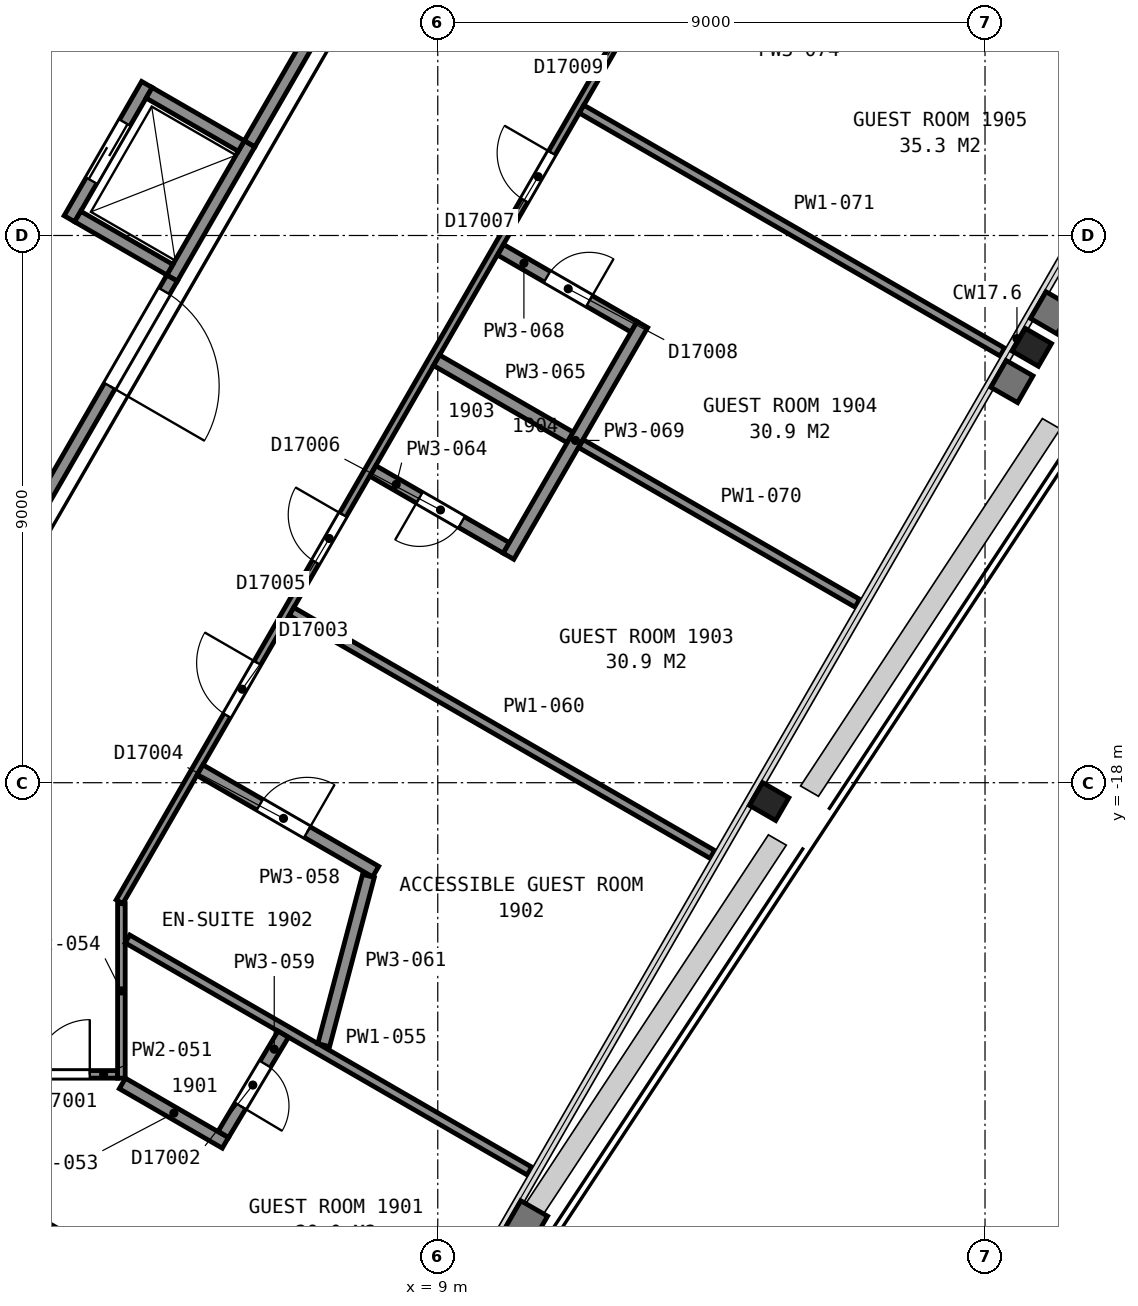
"""IFC4 building model, lengths in metres.
Left out: names, types, materials, properties, quantities, classifications, styles, units other than length and angle.
Written with IfcOpenShell. Run it as: python <this file> out.ifc"""

import sys

from ifc_helpers import new_model, si_unit, direction, frame, frame_2d, origin, origin_2d, place, context, subcontext, project, spatial, rectangle, i_section, extrude, element, fill, save


model = new_model("IFC4")
c1 = context("Model", 3, precision=1e-05, world=origin(), true_north=direction((0.0, 1.0)))
c2 = subcontext(c1, "Body", "Model", "MODEL_VIEW")
j1 = project(units=[si_unit("LENGTHUNIT", "METRE"), si_unit("PLANEANGLEUNIT", "RADIAN")], contexts=[c1])
p1 = place(None, origin())
s1 = spatial("IfcSite", under=j1, at=p1, CompositionType="ELEMENT")
p2 = place(p1, origin())
s2 = spatial("IfcBuilding", under=s1, at=p2, CompositionType="ELEMENT")
p3 = place(p2, frame((0.0, 0.0, 83.6)))
s3 = spatial("IfcBuildingStorey", under=s2, at=p3, CompositionType="ELEMENT", Elevation=83.6)
for number, where, z_axis, x_axis in (
    (1, (14.45, -18.31, 0.0), (0.0, 0.0, 1.0), (-0.5, -0.866, 0.0)),
    (2, (18.77, -10.84, 0.0), (0.0, 0.0, 1.0), (-0.5, -0.866, 0.0)),
):
    element("IfcColumn", number, at=place(p3, frame(where, z_axis=z_axis, x_axis=x_axis)), inside=s3, PredefinedType="COLUMN", context=c2, shape_type="SweptSolid", body=[
        extrude(i_section(OverallWidth=0.432, OverallDepth=0.498, WebThickness=0.056, FlangeThickness=0.089, FilletRadius=0.015, at=origin_2d()), origin(), (0.0, 0.0, 1.0), 2.87),
    ])
p4 = place(p3, frame((4.63, -9.7, 0.0), z_axis=(0.0, 0.0, 1.0), x_axis=(0.500062241894, 0.865989465428, 0.0)))
e3 = element("IfcWall", 3, at=p4, inside=s3, PredefinedType="PARTITIONING", context=c2, shape_type="SweptSolid", body=[
    extrude(rectangle(XDim=2.55, YDim=0.2, at=frame_2d((1.275, 0.0))), origin(), (0.0, 0.0, 1.0), 3.6),
])
p5 = place(p3, frame((2.942, -8.725, 0.0), z_axis=(0.0, 0.0, 1.0), x_axis=(0.500020783669, 0.866013403995, 0.0)))
e4 = element("IfcWall", 4, at=p5, inside=s3, PredefinedType="PARTITIONING", context=c2, shape_type="SweptSolid", body=[
    extrude(rectangle(XDim=2.55, YDim=0.2, at=frame_2d((1.275, 0.0))), origin(), (0.0, 0.0, 1.0), 3.6),
])
p6 = place(p5, frame((0.725, 0.0, 0.0)))
e5 = element("IfcOpeningElement", 5, at=p6, cuts=e4, PredefinedType="OPENING", context=c2, shape_type="SweptSolid", body=[
    extrude(rectangle(XDim=1.1, YDim=2.1, at=frame_2d((0.55, 1.05))), frame((0.0, 0.11, 0.0), z_axis=(0.0, -1.0, 0.0), x_axis=(1.0, 0.0, 0.0)), (0.0, 0.0, 1.0), 0.22),
])
p7 = place(p3, frame((5.769, -7.528, 0.0), z_axis=(0.0, 0.0, 1.0), x_axis=(-0.866002029911, 0.500040482552, 0.0)))
e6 = element("IfcWall", 6, at=p7, inside=s3, PredefinedType="PARTITIONING", context=c2, shape_type="SweptSolid", body=[
    extrude(rectangle(XDim=1.75, YDim=0.2, at=frame_2d((0.875, 0.0))), origin(), (0.0, 0.0, 1.0), 3.6),
])
p8 = place(p3, frame((4.594, -9.563, 0.0), z_axis=(0.0, 0.0, 1.0), x_axis=(-0.866036909293, 0.499980071345, 0.0)))
e7 = element("IfcWall", 7, at=p8, inside=s3, PredefinedType="PARTITIONING", context=c2, shape_type="SweptSolid", body=[
    extrude(rectangle(XDim=1.75, YDim=0.2, at=frame_2d((0.875, 0.0))), origin(), (0.0, 0.0, 1.0), 3.6),
])
p9 = place(p3, frame((1.677, -14.815, 0.0), z_axis=(0.0, 0.0, 1.0), x_axis=(0.49999445743, 0.866028603765, 0.0)))
e8 = element("IfcWall", 8, at=p9, inside=s3, PredefinedType="PARTITIONING", context=c2, shape_type="SweptSolid", body=[
    extrude(rectangle(XDim=5.905, YDim=0.2, at=frame_2d((2.952, 0.0))), origin(), (0.0, 0.0, 1.0), 3.35),
])
p10 = place(p9, frame((3.855, 0.0, 0.0)))
e9 = element("IfcOpeningElement", 9, at=p10, cuts=e8, PredefinedType="OPENING", context=c2, shape_type="SweptSolid", body=[
    extrude(rectangle(XDim=1.8, YDim=2.1, at=frame_2d((0.9, 1.05))), frame((0.0, 0.11, 0.0), z_axis=(0.0, -1.0, 0.0), x_axis=(1.0, 0.0, 0.0)), (0.0, 0.0, 1.0), 0.22),
])
p11 = place(p3, frame((5.906, -7.49, 0.0), z_axis=(0.0, 0.0, 1.0), x_axis=(0.500252727967, 0.865879442048, 0.0)))
e10 = element("IfcWall", 10, at=p11, inside=s3, PredefinedType="PARTITIONING", context=c2, shape_type="SweptSolid", body=[
    extrude(rectangle(XDim=2.617, YDim=0.2, at=frame_2d((1.309, 0.0))), origin(), (0.0, 0.0, 1.0), 3.35),
])
p12 = place(p3, frame((1.203, -24.522, 0.0), z_axis=(0.0, 0.0, 1.0), x_axis=(0.866021771655, -0.500006290979, 0.0)))
e11 = element("IfcWall", 11, at=p12, inside=s3, PredefinedType="PARTITIONING", context=c2, shape_type="SweptSolid", body=[
    extrude(rectangle(XDim=7.992, YDim=0.15, at=frame_2d((3.996, 0.0))), origin(), (0.0, 0.0, 1.0), 2.262),
])
p13 = place(p3, frame((3.732, -22.797, 0.0), z_axis=(0.0, 0.0, 1.0), x_axis=(-1.0, 0.0, 0.0)))
e12 = element("IfcWall", 12, at=p13, inside=s3, PredefinedType="PARTITIONING", context=c2, shape_type="SweptSolid", body=[
    extrude(rectangle(XDim=1.52, YDim=0.125, at=frame_2d((0.76, 0.0))), origin(), (0.0, 0.0, 1.0), 2.262),
])
p14 = place(p13, frame((0.455, 0.0, 0.0)))
e13 = element("IfcOpeningElement", 13, at=p14, cuts=e12, PredefinedType="OPENING", context=c2, shape_type="SweptSolid", body=[
    extrude(rectangle(XDim=0.9, YDim=2.1, at=frame_2d((0.45, 1.05))), frame((0.0, 0.073, 0.0), z_axis=(0.0, -1.0, 0.0), x_axis=(1.0, 0.0, 0.0)), (0.0, 0.0, 1.0), 0.145),
])
p15 = place(p3, frame((3.813, -22.946, 0.0), z_axis=(0.0, 0.0, 1.0), x_axis=(0.865944380701, -0.500140309845, 0.0)))
e14 = element("IfcWall", 14, at=p15, inside=s3, PredefinedType="PARTITIONING", context=c2, shape_type="SweptSolid", body=[
    extrude(rectangle(XDim=1.956, YDim=0.2, at=frame_2d((0.978, 0.0))), origin(), (0.0, 0.0, 1.0), 2.262),
])
p16 = place(p3, frame((3.797, -22.86, 0.0), z_axis=(0.0, 0.0, 1.0), x_axis=(0.0, 1.0, 0.0)))
e15 = element("IfcWall", 15, at=p16, inside=s3, PredefinedType="PARTITIONING", context=c2, shape_type="SweptSolid", body=[
    extrude(rectangle(XDim=2.871, YDim=0.125, at=frame_2d((1.435, 0.0))), origin(), (0.0, 0.0, 1.0), 2.262),
])
p17 = place(p3, frame((3.897, -20.57, 0.0), z_axis=(0.0, 0.0, 1.0), x_axis=(0.866030628547, -0.499990950336, 0.0)))
e16 = element("IfcWall", 16, at=p17, inside=s3, PredefinedType="PARTITIONING", context=c2, shape_type="SweptSolid", body=[
    extrude(rectangle(XDim=7.635, YDim=0.15, at=frame_2d((3.817, 0.0))), origin(), (0.0, 0.0, 1.0), 2.262),
])
p18 = place(p3, frame((19.456, 7.217, 0.0), z_axis=(0.0, 0.0, 1.0), x_axis=(-0.50002170027, -0.866012874765, 0.0)))
e17 = element("IfcWall", 17, at=p18, inside=s3, PredefinedType="PARTITIONING", context=c2, shape_type="SweptSolid", body=[
    extrude(rectangle(XDim=31.379, YDim=0.125, at=frame_2d((15.69, 0.0))), origin(), (0.0, 0.0, 1.0), 2.262),
])
p19 = place(p18, frame((26.843, 0.0, 0.0)))
e18 = element("IfcOpeningElement", 18, at=p19, cuts=e17, PredefinedType="OPENING", context=c2, shape_type="SweptSolid", body=[
    extrude(rectangle(XDim=1.0, YDim=2.1, at=frame_2d((0.5, 1.05))), frame((0.0, 0.073, 0.0), z_axis=(0.0, -1.0, 0.0), x_axis=(1.0, 0.0, 0.0)), (0.0, 0.0, 1.0), 0.145),
])
p20 = place(p18, frame((24.03, 0.0, 0.0)))
e19 = element("IfcOpeningElement", 19, at=p20, cuts=e17, PredefinedType="OPENING", context=c2, shape_type="SweptSolid", body=[
    extrude(rectangle(XDim=0.9, YDim=2.1, at=frame_2d((0.45, 1.05))), frame((0.0, 0.073, 0.0), z_axis=(0.0, -1.0, 0.0), x_axis=(1.0, 0.0, 0.0)), (0.0, 0.0, 1.0), 0.145),
])
p21 = place(p18, frame((17.159, 0.0, 0.0)))
e20 = element("IfcOpeningElement", 20, at=p21, cuts=e17, PredefinedType="OPENING", context=c2, shape_type="SweptSolid", body=[
    extrude(rectangle(XDim=0.9, YDim=2.1, at=frame_2d((0.45, 1.05))), frame((0.0, 0.073, 0.0), z_axis=(0.0, -1.0, 0.0), x_axis=(1.0, 0.0, 0.0)), (0.0, 0.0, 1.0), 0.145),
])
p22 = place(p18, frame((14.24, 0.0, 0.0)))
e21 = element("IfcOpeningElement", 21, at=p22, cuts=e17, PredefinedType="OPENING", context=c2, shape_type="SweptSolid", body=[
    extrude(rectangle(XDim=0.9, YDim=2.1, at=frame_2d((0.45, 1.05))), frame((0.0, 0.073, 0.0), z_axis=(0.0, -1.0, 0.0), x_axis=(1.0, 0.0, 0.0)), (0.0, 0.0, 1.0), 0.145),
])
p23 = place(p18, frame((6.997, 0.0, 0.0)))
e22 = element("IfcOpeningElement", 22, at=p23, cuts=e17, PredefinedType="OPENING", context=c2, shape_type="SweptSolid", body=[
    extrude(rectangle(XDim=0.9, YDim=2.1, at=frame_2d((0.45, 1.05))), frame((0.0, 0.073, 0.0), z_axis=(0.0, -1.0, 0.0), x_axis=(1.0, 0.0, 0.0)), (0.0, 0.0, 1.0), 0.145),
])
p24 = place(p18, frame((4.327, 0.0, 0.0)))
e23 = element("IfcOpeningElement", 23, at=p24, cuts=e17, PredefinedType="OPENING", context=c2, shape_type="SweptSolid", body=[
    extrude(rectangle(XDim=0.9, YDim=2.1, at=frame_2d((0.45, 1.05))), frame((0.0, 0.073, 0.0), z_axis=(0.0, -1.0, 0.0), x_axis=(1.0, 0.0, 0.0)), (0.0, 0.0, 1.0), 0.145),
])
p25 = place(p3, frame((7.979, -19.462, 0.0), z_axis=(0.0, 0.0, 1.0), x_axis=(-0.866033317326, 0.499986293093, 0.0)))
e24 = element("IfcWall", 24, at=p25, inside=s3, PredefinedType="PARTITIONING", context=c2, shape_type="SweptSolid", body=[
    extrude(rectangle(XDim=3.337, YDim=0.2, at=frame_2d((1.669, 0.0))), origin(), (0.0, 0.0, 1.0), 2.262),
])
p26 = place(p25, frame((1.3, 0.0, 0.0)))
e25 = element("IfcOpeningElement", 25, at=p26, cuts=e24, PredefinedType="OPENING", context=c2, shape_type="SweptSolid", body=[
    extrude(rectangle(XDim=0.9, YDim=2.1, at=frame_2d((0.45, 1.05))), frame((0.0, 0.11, 0.0), z_axis=(0.0, -1.0, 0.0), x_axis=(1.0, 0.0, 0.0)), (0.0, 0.0, 1.0), 0.22),
])
p27 = place(p3, frame((5.474, -23.784, 0.0), z_axis=(0.0, 0.0, 1.0), x_axis=(0.512791921509, 0.858512926656, 0.0)))
e26 = element("IfcWall", 26, at=p27, inside=s3, PredefinedType="PARTITIONING", context=c2, shape_type="SweptSolid", body=[
    extrude(rectangle(XDim=1.919, YDim=0.2, at=frame_2d((0.959, 0.0))), origin(), (0.0, 0.0, 1.0), 2.262),
])
p28 = place(p27, frame((0.545, 0.0, 0.0)))
e27 = element("IfcOpeningElement", 27, at=p28, cuts=e26, PredefinedType="OPENING", context=c2, shape_type="SweptSolid", body=[
    extrude(rectangle(XDim=0.8, YDim=2.1, at=frame_2d((0.4, 1.05))), frame((0.0, 0.11, 0.0), z_axis=(0.0, -1.0, 0.0), x_axis=(1.0, 0.0, 0.0)), (0.0, 0.0, 1.0), 0.22),
])
p29 = place(p3, frame((6.595, -15.183, 0.0), z_axis=(0.0, 0.0, 1.0), x_axis=(0.866014133745, -0.500019519773, 0.0)))
e28 = element("IfcWall", 28, at=p29, inside=s3, PredefinedType="PARTITIONING", context=c2, shape_type="SweptSolid", body=[
    extrude(rectangle(XDim=7.991, YDim=0.15, at=frame_2d((3.996, 0.0))), origin(), (0.0, 0.0, 1.0), 2.262),
])
p30 = place(p3, frame((7.124, -22.317, 0.0), z_axis=(0.0, 0.0, 1.0), x_axis=(0.255720101769, 0.966750862193, 0.0)))
e29 = element("IfcWall", 29, at=p30, inside=s3, PredefinedType="PARTITIONING", context=c2, shape_type="SweptSolid", body=[
    extrude(rectangle(XDim=2.879, YDim=0.2, at=frame_2d((1.44, 0.0))), origin(), (0.0, 0.0, 1.0), 2.262),
])
p31 = place(p3, frame((7.935, -12.873, 0.0), z_axis=(0.0, 0.0, 1.0), x_axis=(0.866015388607, -0.500017346395, 0.0)))
e30 = element("IfcWall", 30, at=p31, inside=s3, PredefinedType="PARTITIONING", context=c2, shape_type="SweptSolid", body=[
    extrude(rectangle(XDim=2.532, YDim=0.2, at=frame_2d((1.266, 0.0))), origin(), (0.0, 0.0, 1.0), 2.262),
])
p32 = place(p31, frame((0.883, 0.0, 0.0)))
e31 = element("IfcOpeningElement", 31, at=p32, cuts=e30, PredefinedType="OPENING", context=c2, shape_type="SweptSolid", body=[
    extrude(rectangle(XDim=0.8, YDim=2.1, at=frame_2d((0.4, 1.05))), frame((0.0, 0.11, 0.0), z_axis=(0.0, -1.0, 0.0), x_axis=(1.0, 0.0, 0.0)), (0.0, 0.0, 1.0), 0.22),
])
p33 = place(p3, frame((8.98, -11.052, 0.0), z_axis=(0.0, 0.0, 1.0), x_axis=(0.865990087344, -0.500061164881, 0.0)))
e32 = element("IfcWall", 32, at=p33, inside=s3, PredefinedType="PARTITIONING", context=c2, shape_type="SweptSolid", body=[
    extrude(rectangle(XDim=2.537, YDim=0.2, at=frame_2d((1.269, 0.0))), origin(), (0.0, 0.0, 1.0), 2.262),
])
p34 = place(p3, frame((12.228, -10.502, 0.0), z_axis=(0.0, 0.0, 1.0), x_axis=(-0.866111763775, 0.499850390267, 0.0)))
e33 = element("IfcWall", 33, at=p34, inside=s3, PredefinedType="PARTITIONING", context=c2, shape_type="SweptSolid", body=[
    extrude(rectangle(XDim=2.533, YDim=0.2, at=frame_2d((1.267, 0.0))), origin(), (0.0, 0.0, 1.0), 2.262),
])
p35 = place(p34, frame((0.851, 0.0, 0.0)))
e34 = element("IfcOpeningElement", 34, at=p35, cuts=e33, PredefinedType="OPENING", context=c2, shape_type="SweptSolid", body=[
    extrude(rectangle(XDim=0.8, YDim=2.1, at=frame_2d((0.4, 1.05))), frame((0.0, 0.11, 0.0), z_axis=(0.0, -1.0, 0.0), x_axis=(1.0, 0.0, 0.0)), (0.0, 0.0, 1.0), 0.22),
])
p36 = place(p3, frame((10.164, -14.276, 0.0), z_axis=(0.0, 0.0, 1.0), x_axis=(0.50017868667, 0.865922214405, 0.0)))
e35 = element("IfcWall", 35, at=p36, inside=s3, PredefinedType="PARTITIONING", context=c2, shape_type="SweptSolid", body=[
    extrude(rectangle(XDim=4.4, YDim=0.2, at=frame_2d((2.2, 0.0))), origin(), (0.0, 0.0, 1.0), 2.262),
])
p37 = place(p3, frame((11.355, -12.424, 0.0), z_axis=(0.0, 0.0, 1.0), x_axis=(0.866030680601, -0.499990860175, 0.0)))
e36 = element("IfcWall", 36, at=p37, inside=s3, PredefinedType="PARTITIONING", context=c2, shape_type="SweptSolid", body=[
    extrude(rectangle(XDim=5.249, YDim=0.15, at=frame_2d((2.625, 0.0))), origin(), (0.0, 0.0, 1.0), 2.262),
])
p38 = place(p3, frame((11.365, -6.921, 0.0), z_axis=(0.0, 0.0, 1.0), x_axis=(0.866008543052, -0.500029202507, 0.0)))
e37 = element("IfcWall", 37, at=p38, inside=s3, PredefinedType="PARTITIONING", context=c2, shape_type="SweptSolid", body=[
    extrude(rectangle(XDim=7.992, YDim=0.15, at=frame_2d((3.996, 0.0))), origin(), (0.0, 0.0, 1.0), 2.262),
])
p39 = place(p3, frame((14.065, -2.254, 0.0), z_axis=(0.0, 0.0, 1.0), x_axis=(0.866045096311, -0.499965889992, 0.0)))
e38 = element("IfcWall", 38, at=p39, inside=s3, PredefinedType="PARTITIONING", context=c2, shape_type="SweptSolid", body=[
    extrude(rectangle(XDim=7.987, YDim=0.15, at=frame_2d((3.993, 0.0))), origin(), (0.0, 0.0, 1.0), 2.262),
])
p40 = place(p6, origin())
e39 = element("IfcDoor", 39, at=p40, inside=s3, OperationType="SLIDING_TO_RIGHT", PredefinedType="DOOR", context=c2, shape_type="SweptSolid", body=[
    extrude(rectangle(XDim=1.1, YDim=2.1, at=frame_2d((0.55, 1.05))), frame((0.0, 0.025, 0.0), z_axis=(0.0, -1.0, 0.0), x_axis=(1.0, 0.0, 0.0)), (0.0, 0.0, 1.0), 0.05),
])
fill(e5, e39)
p41 = place(p10, origin())
e40 = element("IfcDoor", 40, at=p41, inside=s3, OperationType="DOUBLE_DOOR_SINGLE_SWING", PredefinedType="DOOR", context=c2, shape_type="SweptSolid", body=[
    extrude(rectangle(XDim=1.8, YDim=2.1, at=frame_2d((0.9, 1.05))), frame((0.0, 0.025, 0.0), z_axis=(0.0, -1.0, 0.0), x_axis=(1.0, 0.0, 0.0)), (0.0, 0.0, 1.0), 0.05),
])
fill(e9, e40)
p42 = place(p14, origin())
e41 = element("IfcDoor", 41, at=p42, inside=s3, OperationType="SINGLE_SWING_LEFT", PredefinedType="DOOR", context=c2, shape_type="SweptSolid", body=[
    extrude(rectangle(XDim=0.9, YDim=2.1, at=frame_2d((0.45, 1.05))), frame((0.0, 0.025, 0.0), z_axis=(0.0, -1.0, 0.0), x_axis=(1.0, 0.0, 0.0)), (0.0, 0.0, 1.0), 0.05),
])
fill(e13, e41)
p43 = place(p19, origin())
e42 = element("IfcDoor", 42, at=p43, inside=s3, OperationType="SINGLE_SWING_LEFT", PredefinedType="DOOR", context=c2, shape_type="SweptSolid", body=[
    extrude(rectangle(XDim=1.0, YDim=2.1, at=frame_2d((0.5, 1.05))), frame((0.0, 0.025, 0.0), z_axis=(0.0, -1.0, 0.0), x_axis=(1.0, 0.0, 0.0)), (0.0, 0.0, 1.0), 0.05),
])
fill(e18, e42)
p44 = place(p20, origin())
e43 = element("IfcDoor", 43, at=p44, inside=s3, OperationType="SINGLE_SWING_LEFT", PredefinedType="DOOR", context=c2, shape_type="SweptSolid", body=[
    extrude(rectangle(XDim=0.9, YDim=2.1, at=frame_2d((0.45, 1.05))), frame((0.0, 0.025, 0.0), z_axis=(0.0, -1.0, 0.0), x_axis=(1.0, 0.0, 0.0)), (0.0, 0.0, 1.0), 0.05),
])
fill(e19, e43)
p45 = place(p21, origin())
e44 = element("IfcDoor", 44, at=p45, inside=s3, OperationType="SINGLE_SWING_LEFT", PredefinedType="DOOR", context=c2, shape_type="SweptSolid", body=[
    extrude(rectangle(XDim=0.9, YDim=2.1, at=frame_2d((0.45, 1.05))), frame((0.0, 0.025, 0.0), z_axis=(0.0, -1.0, 0.0), x_axis=(1.0, 0.0, 0.0)), (0.0, 0.0, 1.0), 0.05),
])
fill(e20, e44)
p46 = place(p26, origin())
e45 = element("IfcDoor", 45, at=p46, inside=s3, OperationType="SINGLE_SWING_LEFT", PredefinedType="DOOR", context=c2, shape_type="SweptSolid", body=[
    extrude(rectangle(XDim=0.9, YDim=2.1, at=frame_2d((0.45, 1.05))), frame((0.0, 0.025, 0.0), z_axis=(0.0, -1.0, 0.0), x_axis=(1.0, 0.0, 0.0)), (0.0, 0.0, 1.0), 0.05),
])
fill(e25, e45)
p47 = place(p28, origin())
e46 = element("IfcDoor", 46, at=p47, inside=s3, OperationType="SINGLE_SWING_LEFT", PredefinedType="DOOR", context=c2, shape_type="SweptSolid", body=[
    extrude(rectangle(XDim=0.8, YDim=2.1, at=frame_2d((0.4, 1.05))), frame((0.0, 0.025, 0.0), z_axis=(0.0, -1.0, 0.0), x_axis=(1.0, 0.0, 0.0)), (0.0, 0.0, 1.0), 0.05),
])
fill(e27, e46)
p48 = place(p32, origin())
e47 = element("IfcDoor", 47, at=p48, inside=s3, OperationType="SINGLE_SWING_LEFT", PredefinedType="DOOR", context=c2, shape_type="SweptSolid", body=[
    extrude(rectangle(XDim=0.8, YDim=2.1, at=frame_2d((0.4, 1.05))), frame((0.0, 0.025, 0.0), z_axis=(0.0, -1.0, 0.0), x_axis=(1.0, 0.0, 0.0)), (0.0, 0.0, 1.0), 0.05),
])
fill(e31, e47)
p49 = place(p35, origin())
e48 = element("IfcDoor", 48, at=p49, inside=s3, OperationType="SINGLE_SWING_LEFT", PredefinedType="DOOR", context=c2, shape_type="SweptSolid", body=[
    extrude(rectangle(XDim=0.8, YDim=2.1, at=frame_2d((0.4, 1.05))), frame((0.0, 0.025, 0.0), z_axis=(0.0, -1.0, 0.0), x_axis=(1.0, 0.0, 0.0)), (0.0, 0.0, 1.0), 0.05),
])
fill(e34, e48)
save(model, sys.argv[1])
